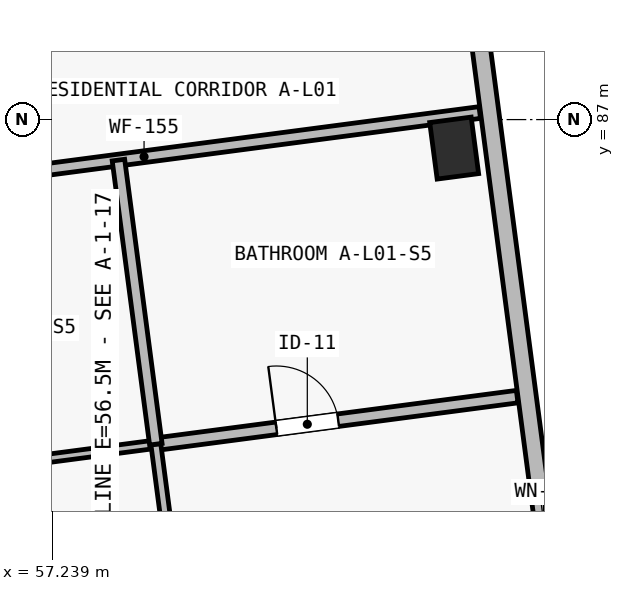
"""IFC4 building model, lengths in metres.
Left out: names, types, materials, properties, quantities, classifications, styles, units other than length and angle.
Written with IfcOpenShell. Run it as: python <this file> out.ifc"""

import sys

from ifc_helpers import new_model, si_unit, direction, frame, frame_2d, origin, origin_2d, place, context, subcontext, project, spatial, rectangle, extrude, element, fill, save


model = new_model("IFC4")
c1 = context("Model", 3, precision=1e-05, world=origin(), true_north=direction((0.0, 1.0)))
c2 = subcontext(c1, "Body", "Model", "MODEL_VIEW")
j1 = project(units=[si_unit("LENGTHUNIT", "METRE"), si_unit("PLANEANGLEUNIT", "RADIAN")], contexts=[c1])
p1 = place(None, origin())
s1 = spatial("IfcSite", under=j1, at=p1, CompositionType="ELEMENT")
p2 = place(p1, origin())
s2 = spatial("IfcBuilding", under=s1, at=p2, CompositionType="ELEMENT")
p3 = place(p2, frame((0.0, 0.0, 4.5)))
s3 = spatial("IfcBuildingStorey", under=s2, at=p3, CompositionType="ELEMENT", Elevation=4.5)
p4 = place(p3, frame((62.53, 86.625, 0.0), z_axis=(0.0, 0.0, 1.0), x_axis=(0.991444861374, 0.13052619222, 0.0)))
e1 = element("IfcColumn", 1, at=p4, inside=s3, PredefinedType="COLUMN", context=c2, shape_type="SweptSolid", body=[
    extrude(rectangle(XDim=0.55, YDim=0.75, at=origin_2d()), origin(), (0.0, 0.0, 1.0), 3.9),
])
p5 = place(p3, frame((61.39, 99.31, 0.0), z_axis=(0.0, 0.0, 1.0), x_axis=(0.13052411616, -0.99144513469, 0.0)))
e2 = element("IfcWall", 2, at=p5, inside=s3, PredefinedType="SOLIDWALL", context=c2, shape_type="SweptSolid", body=[
    extrude(rectangle(XDim=21.05, YDim=0.24, at=frame_2d((10.525, 0.0))), origin(), (0.0, 0.0, 1.0), 3.65),
])
p6 = place(p5, frame((2.63, 0.0, 0.52)))
e3 = element("IfcOpeningElement", 3, at=p6, cuts=e2, PredefinedType="OPENING", context=c2, shape_type="SweptSolid", body=[
    extrude(rectangle(XDim=0.8, YDim=2.3, at=frame_2d((0.4, 1.15))), frame((0.0, 0.135, 0.0), z_axis=(0.0, -1.0, 0.0), x_axis=(1.0, 0.0, 0.0)), (0.0, 0.0, 1.0), 0.27),
])
p7 = place(p5, frame((17.42, 0.0, 0.45)))
e4 = element("IfcOpeningElement", 4, at=p7, cuts=e2, PredefinedType="OPENING", context=c2, shape_type="SweptSolid", body=[
    extrude(rectangle(XDim=0.64, YDim=2.18, at=frame_2d((0.32, 1.09))), frame((0.0, 0.135, 0.0), z_axis=(0.0, -1.0, 0.0), x_axis=(1.0, 0.0, 0.0)), (0.0, 0.0, 1.0), 0.27),
])
p8 = place(p3, frame((54.033, 85.93, 0.0), z_axis=(0.0, 0.0, 1.0), x_axis=(0.991443380249, 0.130537441989, 0.0)))
e5 = element("IfcWall", 5, at=p8, inside=s3, PredefinedType="PARTITIONING", context=c2, shape_type="SweptSolid", body=[
    extrude(rectangle(XDim=8.91, YDim=0.155, at=frame_2d((4.455, 0.0))), origin(), (0.0, 0.0, 1.0), 3.62),
])
p9 = place(p8, frame((1.605, 0.0, 0.0)))
e6 = element("IfcOpeningElement", 6, at=p9, cuts=e5, PredefinedType="OPENING", context=c2, shape_type="SweptSolid", body=[
    extrude(rectangle(XDim=1.02, YDim=2.2, at=frame_2d((0.51, 1.1))), frame((0.0, 0.093, 0.0), z_axis=(0.0, -1.0, 0.0), x_axis=(1.0, 0.0, 0.0)), (0.0, 0.0, 1.0), 0.185),
])
p10 = place(p3, frame((54.357, 82.17, 0.0), z_axis=(0.0, 0.0, 1.0), x_axis=(0.991444014242, 0.130532626667, 0.0)))
e7 = element("IfcWall", 7, at=p10, inside=s3, PredefinedType="PARTITIONING", context=c2, shape_type="SweptSolid", body=[
    extrude(rectangle(XDim=4.285, YDim=0.11, at=frame_2d((2.143, 0.0))), origin(), (0.0, 0.0, 1.0), 3.62),
])
p11 = place(p10, frame((1.825, 0.0, 0.0)))
e8 = element("IfcOpeningElement", 8, at=p11, cuts=e7, PredefinedType="OPENING", context=c2, shape_type="SweptSolid", body=[
    extrude(rectangle(XDim=0.9, YDim=2.1, at=frame_2d((0.45, 1.05))), frame((0.0, 0.07, 0.0), z_axis=(0.0, -1.0, 0.0), x_axis=(1.0, 0.0, 0.0)), (0.0, 0.0, 1.0), 0.14),
])
p12 = place(p3, frame((58.605, 82.729, 0.0), z_axis=(0.0, 0.0, 1.0), x_axis=(0.991449269254, 0.130492706676, 0.0)))
e9 = element("IfcWall", 9, at=p12, inside=s3, PredefinedType="PLUMBINGWALL", context=c2, shape_type="SweptSolid", body=[
    extrude(rectangle(XDim=4.795, YDim=0.165, at=frame_2d((2.397, 0.0))), origin(), (0.0, 0.0, 1.0), 3.62),
])
p13 = place(p12, frame((1.6, 0.0, 0.0)))
e10 = element("IfcOpeningElement", 10, at=p13, cuts=e9, PredefinedType="OPENING", context=c2, shape_type="SweptSolid", body=[
    extrude(rectangle(XDim=0.82, YDim=2.08, at=frame_2d((0.41, 1.04))), frame((0.0, 0.097, 0.0), z_axis=(0.0, -1.0, 0.0), x_axis=(1.0, 0.0, 0.0)), (0.0, 0.0, 1.0), 0.195),
])
p14 = place(p3, frame((59.237, 77.931, 0.0), z_axis=(0.0, 0.0, 1.0), x_axis=(-0.130544545786, 0.991442444908, 0.0)))
e11 = element("IfcWall", 11, at=p14, inside=s3, PredefinedType="PARTITIONING", context=c2, shape_type="SweptSolid", body=[
    extrude(rectangle(XDim=4.84, YDim=0.13, at=frame_2d((2.42, 0.0))), origin(), (0.0, 0.0, 1.0), 3.62),
])
p15 = place(p14, frame((1.35, 0.0, 0.0)))
e12 = element("IfcOpeningElement", 12, at=p15, cuts=e11, PredefinedType="OPENING", context=c2, shape_type="SweptSolid", body=[
    extrude(rectangle(XDim=0.88, YDim=2.1, at=frame_2d((0.44, 1.05))), frame((0.0, 0.08, 0.0), z_axis=(0.0, -1.0, 0.0), x_axis=(1.0, 0.0, 0.0)), (0.0, 0.0, 1.0), 0.16),
])
p16 = place(p3, frame((58.605, 82.729, 0.0), z_axis=(0.0, 0.0, 1.0), x_axis=(-0.130496394248, 0.991448783896, 0.0)))
e13 = element("IfcWall", 13, at=p16, inside=s3, PredefinedType="PLUMBINGWALL", context=c2, shape_type="SweptSolid", body=[
    extrude(rectangle(XDim=3.77, YDim=0.165, at=frame_2d((1.885, 0.0))), origin(), (0.0, 0.0, 1.0), 3.62),
])
p17 = place(p7, origin())
e14 = element("IfcWindow", 14, at=p17, inside=s3, PartitioningType="SINGLE_PANEL", PredefinedType="WINDOW", context=c2, shape_type="SweptSolid", body=[
    extrude(rectangle(XDim=0.64, YDim=2.18, at=frame_2d((0.32, 1.09))), frame((0.0, 0.03, 0.0), z_axis=(0.0, -1.0, 0.0), x_axis=(1.0, 0.0, 0.0)), (0.0, 0.0, 1.0), 0.06),
])
fill(e4, e14)
p18 = place(p13, origin())
e15 = element("IfcDoor", 15, at=p18, inside=s3, OperationType="SINGLE_SWING_LEFT", PredefinedType="DOOR", context=c2, shape_type="SweptSolid", body=[
    extrude(rectangle(XDim=0.82, YDim=2.08, at=frame_2d((0.41, 1.04))), frame((0.0, 0.025, 0.0), z_axis=(0.0, -1.0, 0.0), x_axis=(1.0, 0.0, 0.0)), (0.0, 0.0, 1.0), 0.05),
])
fill(e10, e15)
save(model, sys.argv[1])
